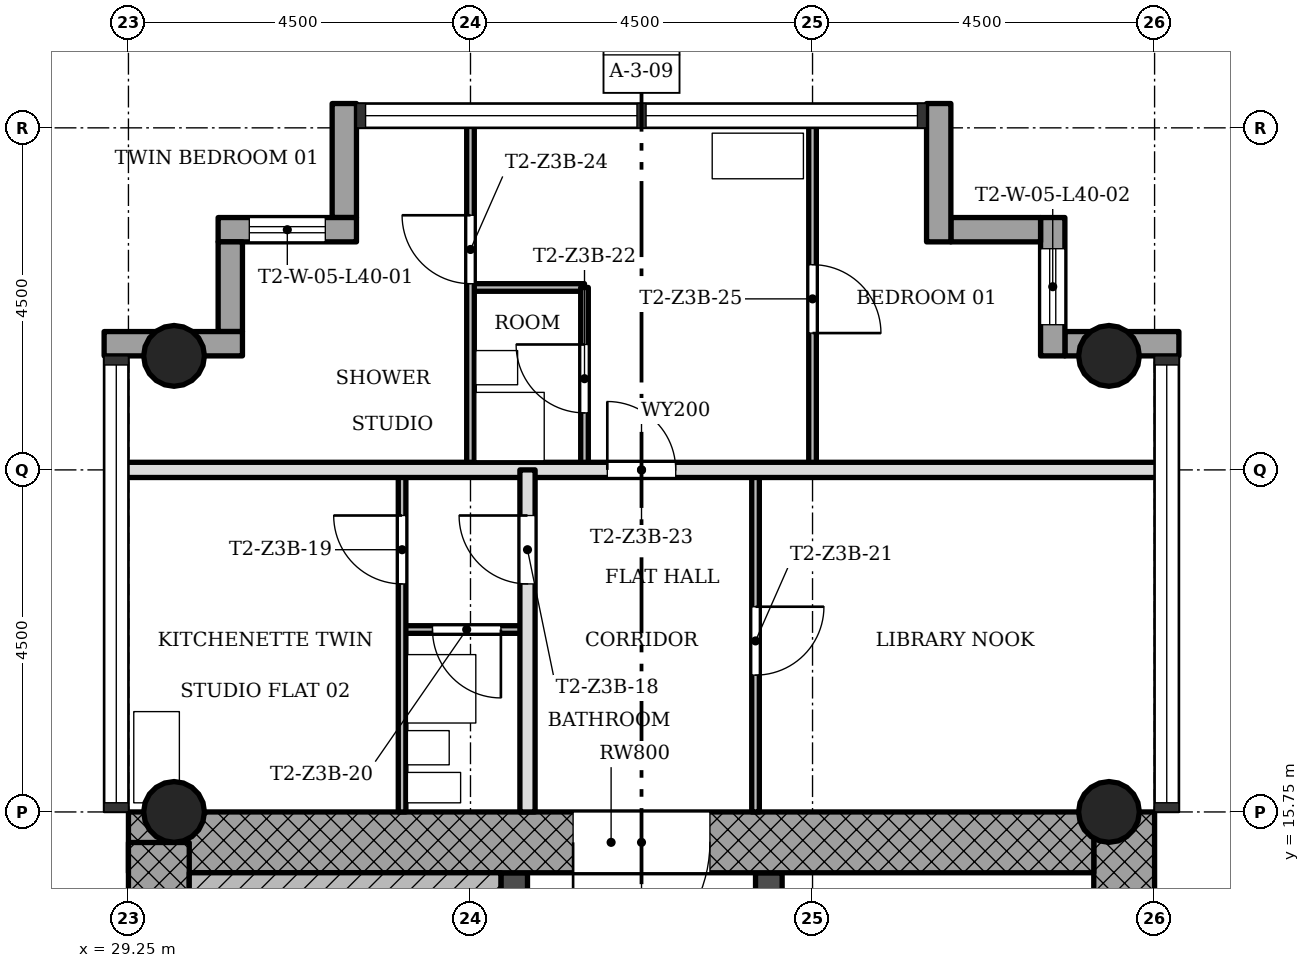
"""IFC4 building model, lengths in metres.
Left out: names, types, materials, properties, quantities, classifications, styles, units other than length and angle.
Written with IfcOpenShell. Run it as: python <this file> out.ifc"""

import sys

from ifc_helpers import new_model, si_unit, direction, frame, frame_2d, origin, origin_2d, place, context, subcontext, project, spatial, rectangle, hollow_circle, extrude, element, fill, save


model = new_model("IFC4")
c1 = context("Model", 3, precision=1e-05, world=origin(), true_north=direction((0.0, 1.0)))
c2 = subcontext(c1, "Body", "Model", "MODEL_VIEW")
j1 = project(units=[si_unit("LENGTHUNIT", "METRE"), si_unit("PLANEANGLEUNIT", "RADIAN")], contexts=[c1])
p1 = place(None, origin())
s1 = spatial("IfcSite", under=j1, at=p1, CompositionType="ELEMENT")
p2 = place(p1, origin())
s2 = spatial("IfcBuilding", under=s1, at=p2, CompositionType="ELEMENT")
p3 = place(p2, frame((0.0, 0.0, 147.3)))
s3 = spatial("IfcBuildingStorey", under=s2, at=p3, CompositionType="ELEMENT", Elevation=147.3)
p4 = place(p3, frame((42.35, 7.55, 0.0), z_axis=(0.0, 0.0, 1.0), x_axis=(0.0, 1.0, 0.0)))
e1 = element("IfcWall", 1, at=p4, inside=s3, PredefinedType="SHEAR", context=c2, shape_type="SweptSolid", body=[
    extrude(rectangle(XDim=8.2, YDim=0.8, at=frame_2d((4.1, 0.0))), origin(), (0.0, 0.0, 1.0), 3.4),
])
p5 = place(p3, frame((41.95, 15.35, 0.0), z_axis=(0.0, 0.0, 1.0), x_axis=(-1.0, 0.0, 0.0)))
e2 = element("IfcWall", 2, at=p5, inside=s3, PredefinedType="SHEAR", context=c2, shape_type="SweptSolid", body=[
    extrude(rectangle(XDim=12.7, YDim=0.8, at=frame_2d((6.35, 0.0))), origin(), (0.0, 0.0, 1.0), 3.4),
])
p6 = place(p5, frame((5.05, 0.0, 0.0)))
e3 = element("IfcOpeningElement", 3, at=p6, cuts=e2, PredefinedType="OPENING", context=c2, shape_type="SweptSolid", body=[
    extrude(rectangle(XDim=1.8, YDim=2.1, at=frame_2d((0.9, 1.05))), frame((0.0, 0.41, 0.0), z_axis=(0.0, -1.0, 0.0), x_axis=(1.0, 0.0, 0.0)), (0.0, 0.0, 1.0), 0.82),
])
p7 = place(p3, frame((29.65, 15.348, 0.0), z_axis=(0.0, 0.0, 1.0), x_axis=(0.0, -1.0, 0.0)))
e4 = element("IfcWall", 4, at=p7, inside=s3, PredefinedType="SHEAR", context=c2, shape_type="SweptSolid", body=[
    extrude(rectangle(XDim=8.796, YDim=0.8, at=frame_2d((4.398, 0.0))), origin(), (0.0, 0.0, 1.0), 3.4),
])
p8 = place(p3, frame((34.325, 7.55, 0.0), z_axis=(0.0, 0.0, 1.0), x_axis=(0.0, 1.0, 0.0)))
e5 = element("IfcWall", 5, at=p8, inside=s3, PredefinedType="SHEAR", context=c2, shape_type="SweptSolid", body=[
    extrude(rectangle(XDim=7.4, YDim=0.35, at=frame_2d((3.7, 0.0))), origin(), (0.0, 0.0, 1.0), 3.4),
])
p9 = place(p8, frame((0.85, 0.0, 0.0)))
e6 = element("IfcOpeningElement", 6, at=p9, cuts=e5, PredefinedType="OPENING", context=c2, shape_type="SweptSolid", body=[
    extrude(rectangle(XDim=0.9, YDim=2.1, at=frame_2d((0.45, 1.05))), frame((0.0, 0.185, 0.0), z_axis=(0.0, -1.0, 0.0), x_axis=(1.0, 0.0, 0.0)), (0.0, 0.0, 1.0), 0.37),
])
p10 = place(p3, frame((37.675, 7.55, 0.0), z_axis=(0.0, 0.0, 1.0), x_axis=(0.0, 1.0, 0.0)))
e7 = element("IfcWall", 7, at=p10, inside=s3, PredefinedType="SHEAR", context=c2, shape_type="SweptSolid", body=[
    extrude(rectangle(XDim=7.4, YDim=0.35, at=frame_2d((3.7, 0.0))), origin(), (0.0, 0.0, 1.0), 3.4),
])
p11 = place(p10, frame((0.95, 0.0, 0.0)))
e8 = element("IfcOpeningElement", 8, at=p11, cuts=e7, PredefinedType="OPENING", context=c2, shape_type="SweptSolid", body=[
    extrude(rectangle(XDim=1.1, YDim=2.1, at=frame_2d((0.55, 1.05))), frame((0.0, 0.185, 0.0), z_axis=(0.0, -1.0, 0.0), x_axis=(1.0, 0.0, 0.0)), (0.0, 0.0, 1.0), 0.37),
])
p12 = place(p10, frame((3.15, 0.0, 0.0)))
e9 = element("IfcOpeningElement", 9, at=p12, cuts=e7, PredefinedType="OPENING", context=c2, shape_type="SweptSolid", body=[
    extrude(rectangle(XDim=1.1, YDim=2.1, at=frame_2d((0.55, 1.05))), frame((0.0, 0.185, 0.0), z_axis=(0.0, -1.0, 0.0), x_axis=(1.0, 0.0, 0.0)), (0.0, 0.0, 1.0), 0.37),
])
p13 = place(p10, frame((5.35, 0.0, 0.0)))
e10 = element("IfcOpeningElement", 10, at=p13, cuts=e7, PredefinedType="OPENING", context=c2, shape_type="SweptSolid", body=[
    extrude(rectangle(XDim=1.1, YDim=2.1, at=frame_2d((0.55, 1.05))), frame((0.0, 0.185, 0.0), z_axis=(0.0, -1.0, 0.0), x_axis=(1.0, 0.0, 0.0)), (0.0, 0.0, 1.0), 0.37),
])
for number, where, z_axis, x_axis in (
    (11, (42.15, 15.75, 0.0), (0.0, 0.0, 1.0), (1.0, 0.0, 0.0)),
    (12, (29.85, 15.75, 0.0), (0.0, 0.0, 1.0), (1.0, 0.0, 0.0)),
    (13, (42.15, 21.75, 0.0), (0.0, 0.0, 1.0), (1.0, 0.0, 0.0)),
    (14, (29.85, 21.75, 0.0), (0.0, 0.0, 1.0), (1.0, 0.0, 0.0)),
):
    element("IfcColumn", number, at=place(p3, frame(where, z_axis=z_axis, x_axis=x_axis)), inside=s3, PredefinedType="COLUMN", context=c2, shape_type="SweptSolid", body=[
        extrude(hollow_circle(Radius=0.4, WallThickness=0.028, at=origin_2d()), origin(), (0.0, 0.0, 1.0), 3.4),
    ])
p14 = place(p3, frame((43.07, 21.91, -0.3), z_axis=(0.0, 0.0, 1.0), x_axis=(-1.0, 0.0, 0.0)))
e15 = element("IfcWall", 15, at=p14, inside=s3, PredefinedType="STANDARD", context=c2, shape_type="SweptSolid", body=[
    extrude(rectangle(XDim=1.5, YDim=0.32, at=frame_2d((0.75, 0.0))), origin(), (0.0, 0.0, 1.0), 3.4),
])
p15 = place(p3, frame((41.41, 21.75, -0.3), z_axis=(0.0, 0.0, 1.0), x_axis=(0.0, 1.0, 0.0)))
e16 = element("IfcWall", 16, at=p15, inside=s3, PredefinedType="STANDARD", context=c2, shape_type="SweptSolid", body=[
    extrude(rectangle(XDim=1.82, YDim=0.32, at=frame_2d((0.91, 0.0))), origin(), (0.0, 0.0, 1.0), 3.4),
])
p16 = place(p15, frame((0.41, 0.0, 1.2)))
e17 = element("IfcOpeningElement", 17, at=p16, cuts=e16, PredefinedType="OPENING", context=c2, shape_type="SweptSolid", body=[
    extrude(rectangle(XDim=1.0, YDim=1.5, at=frame_2d((0.5, 0.75))), frame((0.0, 0.17, 0.0), z_axis=(0.0, -1.0, 0.0), x_axis=(1.0, 0.0, 0.0)), (0.0, 0.0, 1.0), 0.34),
])
p17 = place(p3, frame((41.25, 23.41, -0.3), z_axis=(0.0, 0.0, 1.0), x_axis=(-1.0, 0.0, 0.0)))
e18 = element("IfcWall", 18, at=p17, inside=s3, PredefinedType="STANDARD", context=c2, shape_type="SweptSolid", body=[
    extrude(rectangle(XDim=1.18, YDim=0.32, at=frame_2d((0.59, 0.0))), origin(), (0.0, 0.0, 1.0), 3.4),
])
p18 = place(p3, frame((39.91, 23.25, -0.3), z_axis=(0.0, 0.0, 1.0), x_axis=(0.0, 1.0, 0.0)))
e19 = element("IfcWall", 19, at=p18, inside=s3, PredefinedType="STANDARD", context=c2, shape_type="SweptSolid", body=[
    extrude(rectangle(XDim=1.82, YDim=0.32, at=frame_2d((0.91, 0.0))), origin(), (0.0, 0.0, 1.0), 3.4),
])
p19 = place(p3, frame((32.09, 25.07, -0.3), z_axis=(0.0, 0.0, 1.0), x_axis=(0.0, -1.0, 0.0)))
e20 = element("IfcWall", 20, at=p19, inside=s3, PredefinedType="STANDARD", context=c2, shape_type="SweptSolid", body=[
    extrude(rectangle(XDim=1.5, YDim=0.32, at=frame_2d((0.75, 0.0))), origin(), (0.0, 0.0, 1.0), 3.4),
])
p20 = place(p3, frame((32.25, 23.41, -0.3), z_axis=(0.0, 0.0, 1.0), x_axis=(-1.0, 0.0, 0.0)))
e21 = element("IfcWall", 21, at=p20, inside=s3, PredefinedType="STANDARD", context=c2, shape_type="SweptSolid", body=[
    extrude(rectangle(XDim=1.82, YDim=0.32, at=frame_2d((0.91, 0.0))), origin(), (0.0, 0.0, 1.0), 3.4),
])
p21 = place(p20, frame((0.41, 0.0, 1.2)))
e22 = element("IfcOpeningElement", 22, at=p21, cuts=e21, PredefinedType="OPENING", context=c2, shape_type="SweptSolid", body=[
    extrude(rectangle(XDim=1.0, YDim=1.5, at=frame_2d((0.5, 0.75))), frame((0.0, 0.17, 0.0), z_axis=(0.0, -1.0, 0.0), x_axis=(1.0, 0.0, 0.0)), (0.0, 0.0, 1.0), 0.34),
])
p22 = place(p3, frame((30.59, 23.25, -0.3), z_axis=(0.0, 0.0, 1.0), x_axis=(0.0, -1.0, 0.0)))
e23 = element("IfcWall", 23, at=p22, inside=s3, PredefinedType="STANDARD", context=c2, shape_type="SweptSolid", body=[
    extrude(rectangle(XDim=1.18, YDim=0.32, at=frame_2d((0.59, 0.0))), origin(), (0.0, 0.0, 1.0), 3.4),
])
p23 = place(p3, frame((30.75, 21.91, -0.3), z_axis=(0.0, 0.0, 1.0), x_axis=(-1.0, 0.0, 0.0)))
e24 = element("IfcWall", 24, at=p23, inside=s3, PredefinedType="STANDARD", context=c2, shape_type="SweptSolid", body=[
    extrude(rectangle(XDim=1.82, YDim=0.32, at=frame_2d((0.91, 0.0))), origin(), (0.0, 0.0, 1.0), 3.4),
])
p24 = place(p3, frame((34.5, 18.15, 0.0), z_axis=(0.0, 0.0, 1.0), x_axis=(-1.0, 0.0, 0.0)))
e25 = element("IfcWall", 25, at=p24, inside=s3, PredefinedType="PARTITIONING", context=c2, shape_type="SweptSolid", body=[
    extrude(rectangle(XDim=1.65, YDim=0.1, at=frame_2d((0.825, 0.0))), origin(), (0.0, 0.0, 1.0), 3.0),
])
p25 = place(p24, frame((0.35, 0.0, 0.0)))
e26 = element("IfcOpeningElement", 26, at=p25, cuts=e25, PredefinedType="OPENING", context=c2, shape_type="SweptSolid", body=[
    extrude(rectangle(XDim=0.9, YDim=2.1, at=frame_2d((0.45, 1.05))), frame((0.0, 0.06, 0.0), z_axis=(0.0, -1.0, 0.0), x_axis=(1.0, 0.0, 0.0)), (0.0, 0.0, 1.0), 0.12),
])
p26 = place(p3, frame((42.85, 20.25, 0.0), z_axis=(0.0, 0.0, 1.0), x_axis=(-1.0, 0.0, 0.0)))
e27 = element("IfcWall", 27, at=p26, inside=s3, PredefinedType="SOLIDWALL", context=c2, shape_type="SweptSolid", body=[
    extrude(rectangle(XDim=13.7, YDim=0.2, at=frame_2d((6.85, 0.0))), origin(), (0.0, 0.0, 1.0), 3.0),
])
p27 = place(p26, frame((6.4, 0.0, 0.0)))
e28 = element("IfcOpeningElement", 28, at=p27, cuts=e27, PredefinedType="OPENING", context=c2, shape_type="SweptSolid", body=[
    extrude(rectangle(XDim=0.9, YDim=2.1, at=frame_2d((0.45, 1.05))), frame((0.0, 0.11, 0.0), z_axis=(0.0, -1.0, 0.0), x_axis=(1.0, 0.0, 0.0)), (0.0, 0.0, 1.0), 0.22),
])
p28 = place(p3, frame((35.25, 22.65, 0.0), z_axis=(0.0, 0.0, 1.0), x_axis=(-1.0, 0.0, 0.0)))
e29 = element("IfcWall", 29, at=p28, inside=s3, PredefinedType="PARTITIONING", context=c2, shape_type="SweptSolid", body=[
    extrude(rectangle(XDim=1.5, YDim=0.1, at=frame_2d((0.75, 0.0))), origin(), (0.0, 0.0, 1.0), 3.0),
])
p29 = place(p3, frame((38.25, 20.25, 0.0), z_axis=(0.0, 0.0, 1.0), x_axis=(0.0, 1.0, 0.0)))
e30 = element("IfcWall", 30, at=p29, inside=s3, PredefinedType="PARTITIONING", context=c2, shape_type="SweptSolid", body=[
    extrude(rectangle(XDim=4.6, YDim=0.1, at=frame_2d((2.3, 0.0))), origin(), (0.0, 0.0, 1.0), 3.0),
])
p30 = place(p29, frame((1.8, 0.0, 0.0)))
e31 = element("IfcOpeningElement", 31, at=p30, cuts=e30, PredefinedType="OPENING", context=c2, shape_type="SweptSolid", body=[
    extrude(rectangle(XDim=0.9, YDim=2.1, at=frame_2d((0.45, 1.05))), frame((0.0, 0.06, 0.0), z_axis=(0.0, -1.0, 0.0), x_axis=(1.0, 0.0, 0.0)), (0.0, 0.0, 1.0), 0.12),
])
p31 = place(p3, frame((37.5, 15.75, 0.0), z_axis=(0.0, 0.0, 1.0), x_axis=(0.0, 1.0, 0.0)))
e32 = element("IfcWall", 32, at=p31, inside=s3, PredefinedType="PARTITIONING", context=c2, shape_type="SweptSolid", body=[
    extrude(rectangle(XDim=4.5, YDim=0.1, at=frame_2d((2.25, 0.0))), origin(), (0.0, 0.0, 1.0), 3.0),
])
p32 = place(p31, frame((1.8, 0.0, 0.0)))
e33 = element("IfcOpeningElement", 33, at=p32, cuts=e32, PredefinedType="OPENING", context=c2, shape_type="SweptSolid", body=[
    extrude(rectangle(XDim=0.9, YDim=2.1, at=frame_2d((0.45, 1.05))), frame((0.0, 0.06, 0.0), z_axis=(0.0, -1.0, 0.0), x_axis=(1.0, 0.0, 0.0)), (0.0, 0.0, 1.0), 0.12),
])
p33 = place(p3, frame((35.25, 20.25, 0.0), z_axis=(0.0, 0.0, 1.0), x_axis=(0.0, 1.0, 0.0)))
e34 = element("IfcWall", 34, at=p33, inside=s3, PredefinedType="PARTITIONING", context=c2, shape_type="SweptSolid", body=[
    extrude(rectangle(XDim=2.4, YDim=0.1, at=frame_2d((1.2, 0.0))), origin(), (0.0, 0.0, 1.0), 3.0),
])
p34 = place(p33, frame((0.75, 0.0, 0.0)))
e35 = element("IfcOpeningElement", 35, at=p34, cuts=e34, PredefinedType="OPENING", context=c2, shape_type="SweptSolid", body=[
    extrude(rectangle(XDim=0.9, YDim=2.1, at=frame_2d((0.45, 1.05))), frame((0.0, 0.06, 0.0), z_axis=(0.0, -1.0, 0.0), x_axis=(1.0, 0.0, 0.0)), (0.0, 0.0, 1.0), 0.12),
])
p35 = place(p3, frame((34.5, 15.75, 0.0), z_axis=(0.0, 0.0, 1.0), x_axis=(0.0, 1.0, 0.0)))
e36 = element("IfcWall", 36, at=p35, inside=s3, PredefinedType="SOLIDWALL", context=c2, shape_type="SweptSolid", body=[
    extrude(rectangle(XDim=4.5, YDim=0.2, at=frame_2d((2.25, 0.0))), origin(), (0.0, 0.0, 1.0), 3.0),
])
p36 = place(p35, frame((3.0, 0.0, 0.0)))
e37 = element("IfcOpeningElement", 37, at=p36, cuts=e36, PredefinedType="OPENING", context=c2, shape_type="SweptSolid", body=[
    extrude(rectangle(XDim=0.9, YDim=2.1, at=frame_2d((0.45, 1.05))), frame((0.0, 0.11, 0.0), z_axis=(0.0, -1.0, 0.0), x_axis=(1.0, 0.0, 0.0)), (0.0, 0.0, 1.0), 0.22),
])
p37 = place(p3, frame((33.75, 20.25, 0.0), z_axis=(0.0, 0.0, 1.0), x_axis=(0.0, 1.0, 0.0)))
e38 = element("IfcWall", 38, at=p37, inside=s3, PredefinedType="PARTITIONING", context=c2, shape_type="SweptSolid", body=[
    extrude(rectangle(XDim=4.6, YDim=0.1, at=frame_2d((2.3, 0.0))), origin(), (0.0, 0.0, 1.0), 3.0),
])
p38 = place(p37, frame((2.45, 0.0, 0.0)))
e39 = element("IfcOpeningElement", 39, at=p38, cuts=e38, PredefinedType="OPENING", context=c2, shape_type="SweptSolid", body=[
    extrude(rectangle(XDim=0.9, YDim=2.1, at=frame_2d((0.45, 1.05))), frame((0.0, 0.06, 0.0), z_axis=(0.0, -1.0, 0.0), x_axis=(1.0, 0.0, 0.0)), (0.0, 0.0, 1.0), 0.12),
])
p39 = place(p3, frame((32.85, 15.75, 0.0), z_axis=(0.0, 0.0, 1.0), x_axis=(0.0, 1.0, 0.0)))
e40 = element("IfcWall", 40, at=p39, inside=s3, PredefinedType="PARTITIONING", context=c2, shape_type="SweptSolid", body=[
    extrude(rectangle(XDim=4.5, YDim=0.1, at=frame_2d((2.25, 0.0))), origin(), (0.0, 0.0, 1.0), 3.0),
])
p40 = place(p39, frame((3.0, 0.0, 0.0)))
e41 = element("IfcOpeningElement", 41, at=p40, cuts=e40, PredefinedType="OPENING", context=c2, shape_type="SweptSolid", body=[
    extrude(rectangle(XDim=0.9, YDim=2.1, at=frame_2d((0.45, 1.05))), frame((0.0, 0.06, 0.0), z_axis=(0.0, -1.0, 0.0), x_axis=(1.0, 0.0, 0.0)), (0.0, 0.0, 1.0), 0.12),
])
p41 = place(p3, frame((34.15, 14.75, 0.0), z_axis=(0.0, 0.0, 1.0), x_axis=(-1.0, 0.0, 0.0)))
e42 = element("IfcWall", 42, at=p41, inside=s3, PredefinedType="SHEAR", context=c2, shape_type="SweptSolid", body=[
    extrude(rectangle(XDim=4.1, YDim=0.4, at=frame_2d((2.05, 0.0))), origin(), (0.0, 0.0, 1.0), 3.4),
])
p42 = place(p36, origin())
e43 = element("IfcDoor", 43, at=p42, inside=s3, OperationType="SINGLE_SWING_LEFT", PredefinedType="DOOR", context=c2, shape_type="SweptSolid", body=[
    extrude(rectangle(XDim=0.9, YDim=2.1, at=frame_2d((0.45, 1.05))), frame((0.0, 0.025, 0.0), z_axis=(0.0, -1.0, 0.0), x_axis=(1.0, 0.0, 0.0)), (0.0, 0.0, 1.0), 0.05),
])
fill(e37, e43)
p43 = place(p40, origin())
e44 = element("IfcDoor", 44, at=p43, inside=s3, OperationType="SINGLE_SWING_LEFT", PredefinedType="DOOR", context=c2, shape_type="SweptSolid", body=[
    extrude(rectangle(XDim=0.9, YDim=2.1, at=frame_2d((0.45, 1.05))), frame((0.0, 0.025, 0.0), z_axis=(0.0, -1.0, 0.0), x_axis=(1.0, 0.0, 0.0)), (0.0, 0.0, 1.0), 0.05),
])
fill(e41, e44)
p44 = place(p25, origin())
e45 = element("IfcDoor", 45, at=p44, inside=s3, OperationType="SINGLE_SWING_RIGHT", PredefinedType="DOOR", context=c2, shape_type="SweptSolid", body=[
    extrude(rectangle(XDim=0.9, YDim=2.1, at=frame_2d((0.45, 1.05))), frame((0.0, 0.025, 0.0), z_axis=(0.0, -1.0, 0.0), x_axis=(1.0, 0.0, 0.0)), (0.0, 0.0, 1.0), 0.05),
])
fill(e26, e45)
p45 = place(p32, origin())
e46 = element("IfcDoor", 46, at=p45, inside=s3, OperationType="SINGLE_SWING_RIGHT", PredefinedType="DOOR", context=c2, shape_type="SweptSolid", body=[
    extrude(rectangle(XDim=0.9, YDim=2.1, at=frame_2d((0.45, 1.05))), frame((0.0, 0.025, 0.0), z_axis=(0.0, -1.0, 0.0), x_axis=(1.0, 0.0, 0.0)), (0.0, 0.0, 1.0), 0.05),
])
fill(e33, e46)
p46 = place(p34, origin())
e47 = element("IfcDoor", 47, at=p46, inside=s3, OperationType="SINGLE_SWING_LEFT", PredefinedType="DOOR", context=c2, shape_type="SweptSolid", body=[
    extrude(rectangle(XDim=0.9, YDim=2.1, at=frame_2d((0.45, 1.05))), frame((0.0, 0.025, 0.0), z_axis=(0.0, -1.0, 0.0), x_axis=(1.0, 0.0, 0.0)), (0.0, 0.0, 1.0), 0.05),
])
fill(e35, e47)
p47 = place(p27, origin())
e48 = element("IfcDoor", 48, at=p47, inside=s3, OperationType="SINGLE_SWING_RIGHT", PredefinedType="DOOR", context=c2, shape_type="SweptSolid", body=[
    extrude(rectangle(XDim=0.9, YDim=2.1, at=frame_2d((0.45, 1.05))), frame((0.0, 0.025, 0.0), z_axis=(0.0, -1.0, 0.0), x_axis=(1.0, 0.0, 0.0)), (0.0, 0.0, 1.0), 0.05),
])
fill(e28, e48)
p48 = place(p38, origin())
e49 = element("IfcDoor", 49, at=p48, inside=s3, OperationType="SINGLE_SWING_LEFT", PredefinedType="DOOR", context=c2, shape_type="SweptSolid", body=[
    extrude(rectangle(XDim=0.9, YDim=2.1, at=frame_2d((0.45, 1.05))), frame((0.0, 0.025, 0.0), z_axis=(0.0, -1.0, 0.0), x_axis=(1.0, 0.0, 0.0)), (0.0, 0.0, 1.0), 0.05),
])
fill(e39, e49)
p49 = place(p30, origin())
e50 = element("IfcDoor", 50, at=p49, inside=s3, OperationType="SINGLE_SWING_LEFT", PredefinedType="DOOR", context=c2, shape_type="SweptSolid", body=[
    extrude(rectangle(XDim=0.9, YDim=2.1, at=frame_2d((0.45, 1.05))), frame((0.0, 0.025, 0.0), z_axis=(0.0, -1.0, 0.0), x_axis=(1.0, 0.0, 0.0)), (0.0, 0.0, 1.0), 0.05),
])
fill(e31, e50)
p50 = place(p6, origin())
e51 = element("IfcDoor", 51, at=p50, inside=s3, OperationType="SINGLE_SWING_LEFT", PredefinedType="DOOR", context=c2, shape_type="SweptSolid", body=[
    extrude(rectangle(XDim=1.8, YDim=2.1, at=frame_2d((0.9, 1.05))), frame((0.0, 0.025, 0.0), z_axis=(0.0, -1.0, 0.0), x_axis=(1.0, 0.0, 0.0)), (0.0, 0.0, 1.0), 0.05),
])
fill(e3, e51)
p51 = place(p21, origin())
e52 = element("IfcWindow", 52, at=p51, inside=s3, PartitioningType="SINGLE_PANEL", PredefinedType="WINDOW", context=c2, shape_type="SweptSolid", body=[
    extrude(rectangle(XDim=1.0, YDim=1.5, at=frame_2d((0.5, 0.75))), frame((0.0, 0.03, 0.0), z_axis=(0.0, -1.0, 0.0), x_axis=(1.0, 0.0, 0.0)), (0.0, 0.0, 1.0), 0.06),
])
fill(e22, e52)
p52 = place(p16, origin())
e53 = element("IfcWindow", 53, at=p52, inside=s3, PartitioningType="SINGLE_PANEL", PredefinedType="WINDOW", context=c2, shape_type="SweptSolid", body=[
    extrude(rectangle(XDim=1.0, YDim=1.5, at=frame_2d((0.5, 0.75))), frame((0.0, 0.03, 0.0), z_axis=(0.0, -1.0, 0.0), x_axis=(1.0, 0.0, 0.0)), (0.0, 0.0, 1.0), 0.06),
])
fill(e17, e53)
save(model, sys.argv[1])
